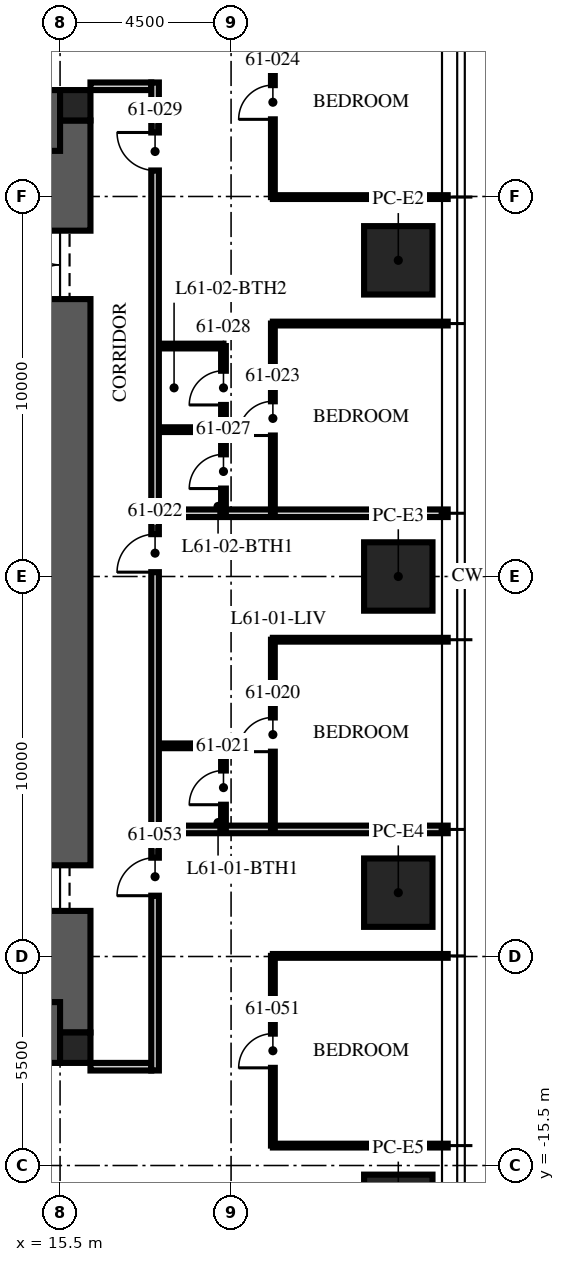
"""IFC4 building model, lengths in metres.
Left out: names, types, materials, properties, quantities, classifications, styles, units other than length and angle.
Written with IfcOpenShell. Run it as: python <this file> out.ifc"""

import sys

from ifc_helpers import new_model, si_unit, direction, frame, frame_2d, origin, origin_2d, place, context, subcontext, project, spatial, rectangle, extrude, element, fill, save


model = new_model("IFC4")
c1 = context("Model", 3, precision=1e-05, world=origin(), true_north=direction((0.0, 1.0)))
c2 = subcontext(c1, "Body", "Model", "MODEL_VIEW")
j1 = project(units=[si_unit("LENGTHUNIT", "METRE"), si_unit("PLANEANGLEUNIT", "RADIAN")], contexts=[c1])
p1 = place(None, origin())
s1 = spatial("IfcSite", under=j1, at=p1, CompositionType="ELEMENT")
p2 = place(p1, origin())
s2 = spatial("IfcBuilding", under=s1, at=p2, CompositionType="ELEMENT")
p3 = place(p2, frame((0.0, 0.0, 244.5)))
s3 = spatial("IfcBuildingStorey", under=s2, at=p3, CompositionType="ELEMENT", Elevation=244.5)
p4 = place(p3, frame((15.5, -12.0, -0.25), z_axis=(0.0, 0.0, 1.0), x_axis=(0.0, 1.0, 0.0)))
e1 = element("IfcWall", 1, at=p4, inside=s3, PredefinedType="SHEAR", context=c2, shape_type="SweptSolid", body=[
    extrude(rectangle(XDim=24.0, YDim=1.6, at=frame_2d((12.0, 0.0))), origin(), (0.0, 0.0, 1.0), 3.75),
])
p5 = place(p4, frame((3.2, 0.0, 0.25)))
e2 = element("IfcOpeningElement", 2, at=p5, cuts=e1, PredefinedType="OPENING", context=c2, shape_type="SweptSolid", body=[
    extrude(rectangle(XDim=1.2, YDim=2.1, at=frame_2d((0.6, 1.05))), frame((0.0, 0.81, 0.0), z_axis=(0.0, -1.0, 0.0), x_axis=(1.0, 0.0, 0.0)), (0.0, 0.0, 1.0), 1.62),
])
p6 = place(p4, frame((19.3, 0.0, 0.25)))
e3 = element("IfcOpeningElement", 3, at=p6, cuts=e1, PredefinedType="OPENING", context=c2, shape_type="SweptSolid", body=[
    extrude(rectangle(XDim=1.8, YDim=2.1, at=frame_2d((0.9, 1.05))), frame((0.0, 0.81, 0.0), z_axis=(0.0, -1.0, 0.0), x_axis=(1.0, 0.0, 0.0)), (0.0, 0.0, 1.0), 1.62),
])
for number, where, z_axis, x_axis in (
    (4, (-15.5, 12.0, -0.25), (0.0, 0.0, 1.0), (1.0, 0.0, 0.0)),
    (5, (-15.5, -12.0, -0.25), (0.0, 0.0, 1.0), (1.0, 0.0, 0.0)),
):
    element("IfcWall", number, at=place(p3, frame(where, z_axis=z_axis, x_axis=x_axis)), inside=s3, PredefinedType="SHEAR", context=c2, shape_type="SweptSolid", body=[
        extrude(rectangle(XDim=31.0, YDim=1.6, at=frame_2d((15.5, 0.0))), origin(), (0.0, 0.0, 1.0), 3.75),
    ])
for number, where, z_axis, x_axis in (
    (6, (15.9, 12.4, -0.25), (0.0, 0.0, 1.0), (1.0, 0.0, 0.0)),
    (7, (15.9, -12.4, -0.25), (0.0, 0.0, 1.0), (1.0, 0.0, 0.0)),
):
    element("IfcColumn", number, at=place(p3, frame(where, z_axis=z_axis, x_axis=x_axis)), inside=s3, PredefinedType="COLUMN", context=c2, shape_type="SweptSolid", body=[
        extrude(rectangle(XDim=0.8, YDim=0.8, at=origin_2d()), origin(), (0.0, 0.0, 1.0), 3.75),
    ])
for number, where, z_axis, x_axis in (
    (8, (24.4, 8.32, 0.0), (0.0, 0.0, 1.0), (0.0, 1.0, 0.0)),
    (9, (24.4, 0.0, 0.0), (0.0, 0.0, 1.0), (0.0, 1.0, 0.0)),
    (10, (24.4, -8.32, 0.0), (0.0, 0.0, 1.0), (0.0, 1.0, 0.0)),
    (11, (24.4, -16.64, 0.0), (0.0, 0.0, 1.0), (0.0, 1.0, 0.0)),
):
    element("IfcColumn", number, at=place(p3, frame(where, z_axis=z_axis, x_axis=x_axis)), inside=s3, PredefinedType="COLUMN", context=c2, shape_type="SweptSolid", body=[
        extrude(rectangle(XDim=1.8, YDim=1.8, at=origin_2d()), origin(), (0.0, 0.0, 1.0), 3.75),
    ])
for number, where, z_axis, x_axis in (
    (12, (16.3, 12.9, 0.0), (0.0, 0.0, 1.0), (1.0, 0.0, 0.0)),
    (13, (16.3, -12.9, 0.0), (0.0, 0.0, 1.0), (1.0, 0.0, 0.0)),
):
    element("IfcWall", number, at=place(p3, frame(where, z_axis=z_axis, x_axis=x_axis)), inside=s3, PredefinedType="PARTITIONING", context=c2, shape_type="SweptSolid", body=[
        extrude(rectangle(XDim=1.6, YDim=0.2, at=frame_2d((0.8, 0.0))), origin(), (0.0, 0.0, 1.0), 2.3),
    ])
p7 = place(p3, frame((18.1, -6.656, 0.0), z_axis=(0.0, 0.0, 1.0), x_axis=(1.0, 0.0, 0.0)))
e14 = element("IfcWall", 14, at=p7, inside=s3, PredefinedType="PARTITIONING", context=c2, shape_type="SweptSolid", body=[
    extrude(rectangle(XDim=7.6, YDim=0.2, at=frame_2d((3.8, 0.0))), origin(), (0.0, 0.0, 1.0), 2.91),
])
p8 = place(p3, frame((21.1, -1.664, 0.0), z_axis=(0.0, 0.0, 1.0), x_axis=(1.0, 0.0, 0.0)))
e15 = element("IfcWall", 15, at=p8, inside=s3, PredefinedType="PARTITIONING", context=c2, shape_type="SweptSolid", body=[
    extrude(rectangle(XDim=4.6, YDim=0.1, at=frame_2d((2.3, 0.0))), origin(), (0.0, 0.0, 1.0), 2.91),
])
p9 = place(p3, frame((18.1, 1.664, 0.0), z_axis=(0.0, 0.0, 1.0), x_axis=(1.0, 0.0, 0.0)))
e16 = element("IfcWall", 16, at=p9, inside=s3, PredefinedType="PARTITIONING", context=c2, shape_type="SweptSolid", body=[
    extrude(rectangle(XDim=7.6, YDim=0.2, at=frame_2d((3.8, 0.0))), origin(), (0.0, 0.0, 1.0), 2.91),
])
for number, where, z_axis, x_axis in (
    (17, (21.1, 6.656, 0.0), (0.0, 0.0, 1.0), (1.0, 0.0, 0.0)),
    (18, (21.1, 9.984, 0.0), (0.0, 0.0, 1.0), (1.0, 0.0, 0.0)),
    (19, (21.1, -14.976, 0.0), (0.0, 0.0, 1.0), (1.0, 0.0, 0.0)),
    (20, (21.1, -9.984, 0.0), (0.0, 0.0, 1.0), (1.0, 0.0, 0.0)),
):
    element("IfcWall", number, at=place(p3, frame(where, z_axis=z_axis, x_axis=x_axis)), inside=s3, PredefinedType="PARTITIONING", context=c2, shape_type="SweptSolid", body=[
        extrude(rectangle(XDim=4.6, YDim=0.1, at=frame_2d((2.3, 0.0))), origin(), (0.0, 0.0, 1.0), 2.91),
    ])
p10 = place(p3, frame((21.1, -6.656, 0.0), z_axis=(0.0, 0.0, 1.0), x_axis=(0.0, 1.0, 0.0)))
e21 = element("IfcWall", 21, at=p10, inside=s3, PredefinedType="PARTITIONING", context=c2, shape_type="SweptSolid", body=[
    extrude(rectangle(XDim=4.992, YDim=0.1, at=frame_2d((2.496, 0.0))), origin(), (0.0, 0.0, 1.0), 2.81),
])
p11 = place(p10, frame((2.046, 0.0, 0.0)))
e22 = element("IfcOpeningElement", 22, at=p11, cuts=e21, PredefinedType="OPENING", context=c2, shape_type="SweptSolid", body=[
    extrude(rectangle(XDim=0.9, YDim=2.1, at=frame_2d((0.45, 1.05))), frame((0.0, 0.06, 0.0), z_axis=(0.0, -1.0, 0.0), x_axis=(1.0, 0.0, 0.0)), (0.0, 0.0, 1.0), 0.12),
])
p12 = place(p3, frame((19.8, -6.656, 0.0), z_axis=(0.0, 0.0, 1.0), x_axis=(0.0, 1.0, 0.0)))
e23 = element("IfcWall", 23, at=p12, inside=s3, PredefinedType="PARTITIONING", context=c2, shape_type="SweptSolid", body=[
    extrude(rectangle(XDim=2.2, YDim=0.125, at=frame_2d((1.1, 0.0))), origin(), (0.0, 0.0, 1.0), 3.5),
])
p13 = place(p12, frame((0.65, 0.0, 0.0)))
e24 = element("IfcOpeningElement", 24, at=p13, cuts=e23, PredefinedType="OPENING", context=c2, shape_type="SweptSolid", body=[
    extrude(rectangle(XDim=0.9, YDim=2.1, at=frame_2d((0.45, 1.05))), frame((0.0, 0.073, 0.0), z_axis=(0.0, -1.0, 0.0), x_axis=(1.0, 0.0, 0.0)), (0.0, 0.0, 1.0), 0.145),
])
p14 = place(p3, frame((18.1, -4.456, 0.0), z_axis=(0.0, 0.0, 1.0), x_axis=(1.0, 0.0, 0.0)))
e25 = element("IfcWall", 25, at=p14, inside=s3, PredefinedType="PARTITIONING", context=c2, shape_type="SweptSolid", body=[
    extrude(rectangle(XDim=1.7, YDim=0.125, at=frame_2d((0.85, 0.0))), origin(), (0.0, 0.0, 1.0), 3.5),
])
p15 = place(p3, frame((21.1, 1.664, 0.0), z_axis=(0.0, 0.0, 1.0), x_axis=(0.0, 1.0, 0.0)))
e26 = element("IfcWall", 26, at=p15, inside=s3, PredefinedType="PARTITIONING", context=c2, shape_type="SweptSolid", body=[
    extrude(rectangle(XDim=4.992, YDim=0.1, at=frame_2d((2.496, 0.0))), origin(), (0.0, 0.0, 1.0), 2.81),
])
p16 = place(p15, frame((2.046, 0.0, 0.0)))
e27 = element("IfcOpeningElement", 27, at=p16, cuts=e26, PredefinedType="OPENING", context=c2, shape_type="SweptSolid", body=[
    extrude(rectangle(XDim=0.9, YDim=2.1, at=frame_2d((0.45, 1.05))), frame((0.0, 0.06, 0.0), z_axis=(0.0, -1.0, 0.0), x_axis=(1.0, 0.0, 0.0)), (0.0, 0.0, 1.0), 0.12),
])
p17 = place(p3, frame((21.1, 9.984, 0.0), z_axis=(0.0, 0.0, 1.0), x_axis=(0.0, 1.0, 0.0)))
e28 = element("IfcWall", 28, at=p17, inside=s3, PredefinedType="PARTITIONING", context=c2, shape_type="SweptSolid", body=[
    extrude(rectangle(XDim=4.992, YDim=0.1, at=frame_2d((2.496, 0.0))), origin(), (0.0, 0.0, 1.0), 2.81),
])
p18 = place(p17, frame((2.046, 0.0, 0.0)))
e29 = element("IfcOpeningElement", 29, at=p18, cuts=e28, PredefinedType="OPENING", context=c2, shape_type="SweptSolid", body=[
    extrude(rectangle(XDim=0.9, YDim=2.1, at=frame_2d((0.45, 1.05))), frame((0.0, 0.06, 0.0), z_axis=(0.0, -1.0, 0.0), x_axis=(1.0, 0.0, 0.0)), (0.0, 0.0, 1.0), 0.12),
])
p19 = place(p3, frame((19.8, 1.664, 0.0), z_axis=(0.0, 0.0, 1.0), x_axis=(0.0, 1.0, 0.0)))
e30 = element("IfcWall", 30, at=p19, inside=s3, PredefinedType="PARTITIONING", context=c2, shape_type="SweptSolid", body=[
    extrude(rectangle(XDim=4.4, YDim=0.125, at=frame_2d((2.2, 0.0))), origin(), (0.0, 0.0, 1.0), 2.81),
])
p20 = place(p19, frame((0.65, 0.0, 0.0)))
e31 = element("IfcOpeningElement", 31, at=p20, cuts=e30, PredefinedType="OPENING", context=c2, shape_type="SweptSolid", body=[
    extrude(rectangle(XDim=0.9, YDim=2.1, at=frame_2d((0.45, 1.05))), frame((0.0, 0.073, 0.0), z_axis=(0.0, -1.0, 0.0), x_axis=(1.0, 0.0, 0.0)), (0.0, 0.0, 1.0), 0.145),
])
p21 = place(p19, frame((2.85, 0.0, 0.0)))
e32 = element("IfcOpeningElement", 32, at=p21, cuts=e30, PredefinedType="OPENING", context=c2, shape_type="SweptSolid", body=[
    extrude(rectangle(XDim=0.9, YDim=2.1, at=frame_2d((0.45, 1.05))), frame((0.0, 0.073, 0.0), z_axis=(0.0, -1.0, 0.0), x_axis=(1.0, 0.0, 0.0)), (0.0, 0.0, 1.0), 0.145),
])
for number, where, z_axis, x_axis in (
    (33, (18.1, 3.864, 0.0), (0.0, 0.0, 1.0), (1.0, 0.0, 0.0)),
    (34, (18.1, 6.064, 0.0), (0.0, 0.0, 1.0), (1.0, 0.0, 0.0)),
):
    element("IfcWall", number, at=place(p3, frame(where, z_axis=z_axis, x_axis=x_axis)), inside=s3, PredefinedType="PARTITIONING", context=c2, shape_type="SweptSolid", body=[
        extrude(rectangle(XDim=1.7, YDim=0.125, at=frame_2d((0.85, 0.0))), origin(), (0.0, 0.0, 1.0), 3.5),
    ])
p22 = place(p3, frame((21.1, -14.976, 0.0), z_axis=(0.0, 0.0, 1.0), x_axis=(0.0, 1.0, 0.0)))
e35 = element("IfcWall", 35, at=p22, inside=s3, PredefinedType="PARTITIONING", context=c2, shape_type="SweptSolid", body=[
    extrude(rectangle(XDim=4.992, YDim=0.1, at=frame_2d((2.496, 0.0))), origin(), (0.0, 0.0, 1.0), 2.81),
])
p23 = place(p22, frame((2.046, 0.0, 0.0)))
e36 = element("IfcOpeningElement", 36, at=p23, cuts=e35, PredefinedType="OPENING", context=c2, shape_type="SweptSolid", body=[
    extrude(rectangle(XDim=0.9, YDim=2.1, at=frame_2d((0.45, 1.05))), frame((0.0, 0.06, 0.0), z_axis=(0.0, -1.0, 0.0), x_axis=(1.0, 0.0, 0.0)), (0.0, 0.0, 1.0), 0.12),
])
p24 = place(p3, frame((18.0, -13.0, 0.0), z_axis=(0.0, 0.0, 1.0), x_axis=(0.0, 1.0, 0.0)))
e37 = element("IfcWall", 37, at=p24, inside=s3, PredefinedType="PARTITIONING", context=c2, shape_type="SweptSolid", body=[
    extrude(rectangle(XDim=26.0, YDim=0.2, at=frame_2d((13.0, 0.0))), origin(), (0.0, 0.0, 1.0), 2.6),
])
p25 = place(p24, frame((13.114, 0.0, 0.0)))
e38 = element("IfcOpeningElement", 38, at=p25, cuts=e37, PredefinedType="OPENING", context=c2, shape_type="SweptSolid", body=[
    extrude(rectangle(XDim=1.0, YDim=2.2, at=frame_2d((0.5, 1.1))), frame((0.0, 0.11, 0.0), z_axis=(0.0, -1.0, 0.0), x_axis=(1.0, 0.0, 0.0)), (0.0, 0.0, 1.0), 0.22),
])
p26 = place(p24, frame((23.684, 0.0, 0.0)))
e39 = element("IfcOpeningElement", 39, at=p26, cuts=e37, PredefinedType="OPENING", context=c2, shape_type="SweptSolid", body=[
    extrude(rectangle(XDim=1.0, YDim=2.2, at=frame_2d((0.5, 1.1))), frame((0.0, 0.11, 0.0), z_axis=(0.0, -1.0, 0.0), x_axis=(1.0, 0.0, 0.0)), (0.0, 0.0, 1.0), 0.22),
])
p27 = place(p24, frame((4.6, 0.0, 0.0)))
e40 = element("IfcOpeningElement", 40, at=p27, cuts=e37, PredefinedType="OPENING", context=c2, shape_type="SweptSolid", body=[
    extrude(rectangle(XDim=1.0, YDim=2.2, at=frame_2d((0.5, 1.1))), frame((0.0, 0.11, 0.0), z_axis=(0.0, -1.0, 0.0), x_axis=(1.0, 0.0, 0.0)), (0.0, 0.0, 1.0), 0.22),
])
p28 = place(p5, origin())
e41 = element("IfcDoor", 41, at=p28, inside=s3, OperationType="SINGLE_SWING_LEFT", PredefinedType="DOOR", context=c2, shape_type="SweptSolid", body=[
    extrude(rectangle(XDim=1.2, YDim=2.1, at=frame_2d((0.6, 1.05))), frame((0.0, 0.025, 0.0), z_axis=(0.0, -1.0, 0.0), x_axis=(1.0, 0.0, 0.0)), (0.0, 0.0, 1.0), 0.05),
])
fill(e2, e41)
p29 = place(p6, origin())
e42 = element("IfcDoor", 42, at=p29, inside=s3, OperationType="DOUBLE_DOOR_SINGLE_SWING", PredefinedType="DOOR", context=c2, shape_type="SweptSolid", body=[
    extrude(rectangle(XDim=1.8, YDim=2.1, at=frame_2d((0.9, 1.05))), frame((0.0, 0.025, 0.0), z_axis=(0.0, -1.0, 0.0), x_axis=(1.0, 0.0, 0.0)), (0.0, 0.0, 1.0), 0.05),
])
fill(e3, e42)
p30 = place(p11, origin())
e43 = element("IfcDoor", 43, at=p30, inside=s3, OperationType="SINGLE_SWING_LEFT", PredefinedType="DOOR", context=c2, shape_type="SweptSolid", body=[
    extrude(rectangle(XDim=0.9, YDim=2.1, at=frame_2d((0.45, 1.05))), frame((0.0, 0.025, 0.0), z_axis=(0.0, -1.0, 0.0), x_axis=(1.0, 0.0, 0.0)), (0.0, 0.0, 1.0), 0.05),
])
fill(e22, e43)
p31 = place(p13, origin())
e44 = element("IfcDoor", 44, at=p31, inside=s3, OperationType="SINGLE_SWING_LEFT", PredefinedType="DOOR", context=c2, shape_type="SweptSolid", body=[
    extrude(rectangle(XDim=0.9, YDim=2.1, at=frame_2d((0.45, 1.05))), frame((0.0, 0.025, 0.0), z_axis=(0.0, -1.0, 0.0), x_axis=(1.0, 0.0, 0.0)), (0.0, 0.0, 1.0), 0.05),
])
fill(e24, e44)
p32 = place(p25, origin())
e45 = element("IfcDoor", 45, at=p32, inside=s3, OperationType="SINGLE_SWING_LEFT", PredefinedType="DOOR", context=c2, shape_type="SweptSolid", body=[
    extrude(rectangle(XDim=1.0, YDim=2.2, at=frame_2d((0.5, 1.1))), frame((0.0, 0.025, 0.0), z_axis=(0.0, -1.0, 0.0), x_axis=(1.0, 0.0, 0.0)), (0.0, 0.0, 1.0), 0.05),
])
fill(e38, e45)
p33 = place(p16, origin())
e46 = element("IfcDoor", 46, at=p33, inside=s3, OperationType="SINGLE_SWING_LEFT", PredefinedType="DOOR", context=c2, shape_type="SweptSolid", body=[
    extrude(rectangle(XDim=0.9, YDim=2.1, at=frame_2d((0.45, 1.05))), frame((0.0, 0.025, 0.0), z_axis=(0.0, -1.0, 0.0), x_axis=(1.0, 0.0, 0.0)), (0.0, 0.0, 1.0), 0.05),
])
fill(e27, e46)
p34 = place(p18, origin())
e47 = element("IfcDoor", 47, at=p34, inside=s3, OperationType="SINGLE_SWING_LEFT", PredefinedType="DOOR", context=c2, shape_type="SweptSolid", body=[
    extrude(rectangle(XDim=0.9, YDim=2.1, at=frame_2d((0.45, 1.05))), frame((0.0, 0.025, 0.0), z_axis=(0.0, -1.0, 0.0), x_axis=(1.0, 0.0, 0.0)), (0.0, 0.0, 1.0), 0.05),
])
fill(e29, e47)
p35 = place(p20, origin())
e48 = element("IfcDoor", 48, at=p35, inside=s3, OperationType="SINGLE_SWING_LEFT", PredefinedType="DOOR", context=c2, shape_type="SweptSolid", body=[
    extrude(rectangle(XDim=0.9, YDim=2.1, at=frame_2d((0.45, 1.05))), frame((0.0, 0.025, 0.0), z_axis=(0.0, -1.0, 0.0), x_axis=(1.0, 0.0, 0.0)), (0.0, 0.0, 1.0), 0.05),
])
fill(e31, e48)
p36 = place(p21, origin())
e49 = element("IfcDoor", 49, at=p36, inside=s3, OperationType="SINGLE_SWING_LEFT", PredefinedType="DOOR", context=c2, shape_type="SweptSolid", body=[
    extrude(rectangle(XDim=0.9, YDim=2.1, at=frame_2d((0.45, 1.05))), frame((0.0, 0.025, 0.0), z_axis=(0.0, -1.0, 0.0), x_axis=(1.0, 0.0, 0.0)), (0.0, 0.0, 1.0), 0.05),
])
fill(e32, e49)
p37 = place(p26, origin())
e50 = element("IfcDoor", 50, at=p37, inside=s3, OperationType="SINGLE_SWING_RIGHT", PredefinedType="DOOR", context=c2, shape_type="SweptSolid", body=[
    extrude(rectangle(XDim=1.0, YDim=2.2, at=frame_2d((0.5, 1.1))), frame((0.0, 0.025, 0.0), z_axis=(0.0, -1.0, 0.0), x_axis=(1.0, 0.0, 0.0)), (0.0, 0.0, 1.0), 0.05),
])
fill(e39, e50)
p38 = place(p23, origin())
e51 = element("IfcDoor", 51, at=p38, inside=s3, OperationType="SINGLE_SWING_LEFT", PredefinedType="DOOR", context=c2, shape_type="SweptSolid", body=[
    extrude(rectangle(XDim=0.9, YDim=2.1, at=frame_2d((0.45, 1.05))), frame((0.0, 0.025, 0.0), z_axis=(0.0, -1.0, 0.0), x_axis=(1.0, 0.0, 0.0)), (0.0, 0.0, 1.0), 0.05),
])
fill(e36, e51)
p39 = place(p27, origin())
e52 = element("IfcDoor", 52, at=p39, inside=s3, OperationType="SINGLE_SWING_LEFT", PredefinedType="DOOR", context=c2, shape_type="SweptSolid", body=[
    extrude(rectangle(XDim=1.0, YDim=2.2, at=frame_2d((0.5, 1.1))), frame((0.0, 0.025, 0.0), z_axis=(0.0, -1.0, 0.0), x_axis=(1.0, 0.0, 0.0)), (0.0, 0.0, 1.0), 0.05),
])
fill(e40, e52)
save(model, sys.argv[1])
